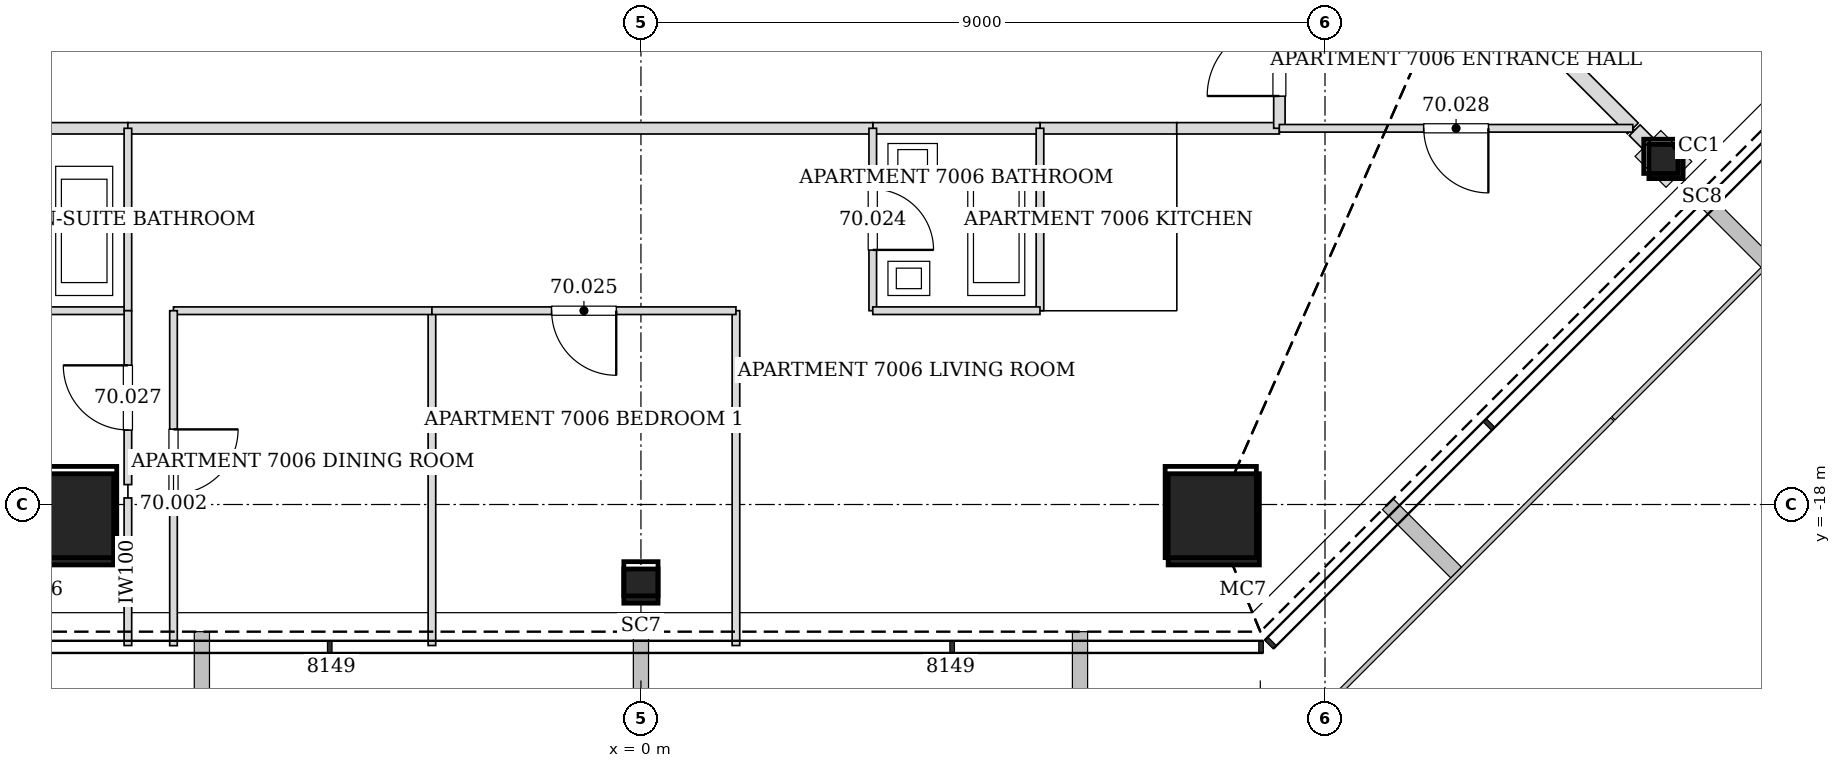
"""IFC4 building model, lengths in metres.
Left out: names, types, materials, properties, quantities, classifications, styles, units other than length and angle.
Written with IfcOpenShell. Run it as: python <this file> out.ifc"""

import sys

from ifc_helpers import new_model, si_unit, direction, frame, frame_2d, origin, origin_2d, place, context, subcontext, project, spatial, rectangle, hollow_rectangle, extrude, element, fill, save


model = new_model("IFC4")
c1 = context("Model", 3, precision=1e-05, world=origin(), true_north=direction((0.0, 1.0)))
c2 = subcontext(c1, "Body", "Model", "MODEL_VIEW")
j1 = project(units=[si_unit("LENGTHUNIT", "METRE"), si_unit("PLANEANGLEUNIT", "RADIAN")], contexts=[c1])
p1 = place(None, origin())
s1 = spatial("IfcSite", under=j1, at=p1, CompositionType="ELEMENT")
p2 = place(p1, origin())
s2 = spatial("IfcBuilding", under=s1, at=p2, CompositionType="ELEMENT")
p3 = place(p2, frame((0.0, 0.0, 287.8)))
s3 = spatial("IfcBuildingStorey", under=s2, at=p3, CompositionType="ELEMENT", Elevation=287.8)
for number, where, z_axis, x_axis in (
    (1, (-7.537, -18.195, 0.0), (0.012, 0.028, 1.0), (-0.924, 0.382, 0.0)),
    (2, (7.537, -18.195, 0.0), (-0.012, 0.028, 1.0), (-0.924, -0.382, 0.0)),
):
    element("IfcColumn", number, at=place(p3, frame(where, z_axis=z_axis, x_axis=x_axis)), inside=s3, PredefinedType="COLUMN", context=c2, shape_type="SweptSolid", body=[
        extrude(hollow_rectangle(XDim=1.2, YDim=1.2, WallThickness=0.055, at=origin_2d()), origin(), (0.0, 0.0, 1.0), 3.402),
    ])
for number, where, z_axis, x_axis in (
    (3, (0.0, -19.073, 0.0), (0.0, 0.028, 1.0), (-1.0, 0.0, 0.0)),
    (4, (13.487, -13.487, 0.0), (-0.02, 0.02, 1.0), (-0.707, -0.707, 0.0)),
):
    element("IfcColumn", number, at=place(p3, frame(where, z_axis=z_axis, x_axis=x_axis)), inside=s3, PredefinedType="COLUMN", context=c2, shape_type="SweptSolid", body=[
        extrude(hollow_rectangle(XDim=0.45, YDim=0.45, WallThickness=0.02, at=origin_2d()), origin(), (0.0, 0.0, 1.0), 3.401),
    ])
p4 = place(p3, frame((5.249, -13.05, 0.0), z_axis=(0.0, 0.0, 1.0), x_axis=(1.0, 0.0, 0.0)))
e5 = element("IfcWall", 5, at=p4, inside=s3, PredefinedType="PARTITIONING", context=c2, shape_type="SweptSolid", body=[
    extrude(rectangle(XDim=1.802, YDim=0.15, at=frame_2d((0.901, 0.0))), origin(), (0.0, 0.0, 1.0), 3.2),
])
for number, where, z_axis, x_axis in (
    (6, (3.049, -13.05, 0.0), (0.0, 0.0, 1.0), (1.0, 0.0, 0.0)),
    (7, (-8.951, -13.05, 0.0), (0.0, 0.0, 1.0), (1.0, 0.0, 0.0)),
):
    element("IfcWall", number, at=place(p3, frame(where, z_axis=z_axis, x_axis=x_axis)), inside=s3, PredefinedType="PARTITIONING", context=c2, shape_type="SweptSolid", body=[
        extrude(rectangle(XDim=2.202, YDim=0.15, at=frame_2d((1.101, 0.0))), origin(), (0.0, 0.0, 1.0), 3.2),
    ])
p5 = place(p3, frame((-6.751, -13.05, 0.0), z_axis=(0.0, 0.0, 1.0), x_axis=(1.0, 0.0, 0.0)))
e8 = element("IfcWall", 8, at=p5, inside=s3, PredefinedType="PARTITIONING", context=c2, shape_type="SweptSolid", body=[
    extrude(rectangle(XDim=9.802, YDim=0.15, at=frame_2d((4.901, 0.0))), origin(), (0.0, 0.0, 1.0), 2.349),
])
p6 = place(p3, frame((7.049, -13.05, 0.0), z_axis=(0.0, 0.0, 1.0), x_axis=(1.0, 0.0, 0.0)))
e9 = element("IfcWall", 9, at=p6, inside=s3, PredefinedType="PARTITIONING", context=c2, shape_type="SweptSolid", body=[
    extrude(rectangle(XDim=1.351, YDim=0.15, at=frame_2d((0.675, 0.0))), origin(), (0.0, 0.0, 1.0), 3.2),
])
p7 = place(p3, frame((8.4, -13.05, 0.0), z_axis=(0.0, 0.0, 1.0), x_axis=(0.0, 1.0, 0.0)))
e10 = element("IfcWall", 10, at=p7, inside=s3, PredefinedType="PARTITIONING", context=c2, shape_type="SweptSolid", body=[
    extrude(rectangle(XDim=1.8, YDim=0.15, at=frame_2d((0.9, 0.0))), origin(), (0.0, 0.0, 1.0), 3.2),
])
p8 = place(p7, frame((0.425, 0.0, 0.0)))
e11 = element("IfcOpeningElement", 11, at=p8, cuts=e10, PredefinedType="OPENING", context=c2, shape_type="SweptSolid", body=[
    extrude(rectangle(XDim=0.95, YDim=2.1, at=frame_2d((0.475, 1.05))), frame((0.0, 0.085, 0.0), z_axis=(0.0, -1.0, 0.0), x_axis=(1.0, 0.0, 0.0)), (0.0, 0.0, 1.0), 0.17),
])
p9 = place(p3, frame((-2.75, -19.855, 0.0), z_axis=(0.0, 0.0, 1.0), x_axis=(0.0, 1.0, 0.0)))
e12 = element("IfcWall", 12, at=p9, inside=s3, PredefinedType="PARTITIONING", context=c2, shape_type="SweptSolid", body=[
    extrude(rectangle(XDim=4.405, YDim=0.1, at=frame_2d((2.203, 0.0))), origin(), (0.0, 0.0, 1.0), 2.73),
])
p10 = place(p3, frame((-2.75, -15.45, 0.0), z_axis=(0.0, 0.0, 1.0), x_axis=(-1.0, 0.0, 0.0)))
e13 = element("IfcWall", 13, at=p10, inside=s3, PredefinedType="PARTITIONING", context=c2, shape_type="SweptSolid", body=[
    extrude(rectangle(XDim=3.4, YDim=0.1, at=frame_2d((1.7, 0.0))), origin(), (0.0, 0.0, 1.0), 3.2),
])
p11 = place(p3, frame((-6.15, -15.45, 0.0), z_axis=(0.0, 0.0, 1.0), x_axis=(0.0, -1.0, 0.0)))
e14 = element("IfcWall", 14, at=p11, inside=s3, PredefinedType="PARTITIONING", context=c2, shape_type="SweptSolid", body=[
    extrude(rectangle(XDim=4.407, YDim=0.1, at=frame_2d((2.204, 0.0))), origin(), (0.0, 0.0, 1.0), 2.73),
])
p12 = place(p11, frame((1.562, 0.0, 0.0)))
e15 = element("IfcOpeningElement", 15, at=p12, cuts=e14, PredefinedType="OPENING", context=c2, shape_type="SweptSolid", body=[
    extrude(rectangle(XDim=0.85, YDim=2.1, at=frame_2d((0.425, 1.05))), frame((0.0, 0.06, 0.0), z_axis=(0.0, -1.0, 0.0), x_axis=(1.0, 0.0, 0.0)), (0.0, 0.0, 1.0), 0.12),
])
p13 = place(p3, frame((13.075, -13.075, 0.0), z_axis=(0.0, 0.0, 1.0), x_axis=(0.707106781187, -0.707106781187, 0.0)))
e16 = element("IfcWall", 16, at=p13, inside=s3, PredefinedType="PARTITIONING", context=c2, shape_type="SweptSolid", body=[
    extrude(rectangle(XDim=0.242, YDim=0.2, at=frame_2d((0.121, 0.0))), origin(), (0.0, 0.0, 1.0), 2.591),
])
p14 = place(p3, frame((11.269, -11.269, 0.0), z_axis=(0.0, 0.0, 1.0), x_axis=(0.707106781187, -0.707106781187, 0.0)))
e17 = element("IfcWall", 17, at=p14, inside=s3, PredefinedType="PARTITIONING", context=c2, shape_type="SweptSolid", body=[
    extrude(rectangle(XDim=2.52, YDim=0.2, at=frame_2d((1.26, 0.0))), origin(), (0.0, 0.0, 1.0), 2.591),
])
p15 = place(p3, frame((5.25, -13.05, 0.0), z_axis=(0.0, 0.0, 1.0), x_axis=(0.0, -1.0, 0.0)))
e18 = element("IfcWall", 18, at=p15, inside=s3, PredefinedType="PARTITIONING", context=c2, shape_type="SweptSolid", body=[
    extrude(rectangle(XDim=2.4, YDim=0.1, at=frame_2d((1.2, 0.0))), origin(), (0.0, 0.0, 1.0), 2.591),
])
p16 = place(p3, frame((3.05, -13.05, 0.0), z_axis=(0.0, 0.0, 1.0), x_axis=(0.0, -1.0, 0.0)))
e19 = element("IfcWall", 19, at=p16, inside=s3, PredefinedType="PARTITIONING", context=c2, shape_type="SweptSolid", body=[
    extrude(rectangle(XDim=2.4, YDim=0.1, at=frame_2d((1.2, 0.0))), origin(), (0.0, 0.0, 1.0), 2.591),
])
p17 = place(p16, frame((0.8, 0.0, 0.0)))
e20 = element("IfcOpeningElement", 20, at=p17, cuts=e19, PredefinedType="OPENING", context=c2, shape_type="SweptSolid", body=[
    extrude(rectangle(XDim=0.8, YDim=2.1, at=frame_2d((0.4, 1.05))), frame((0.0, 0.06, 0.0), z_axis=(0.0, -1.0, 0.0), x_axis=(1.0, 0.0, 0.0)), (0.0, 0.0, 1.0), 0.12),
])
p18 = place(p3, frame((3.05, -15.45, 0.0), z_axis=(0.0, 0.0, 1.0), x_axis=(1.0, 0.0, 0.0)))
e21 = element("IfcWall", 21, at=p18, inside=s3, PredefinedType="PARTITIONING", context=c2, shape_type="SweptSolid", body=[
    extrude(rectangle(XDim=2.2, YDim=0.1, at=frame_2d((1.1, 0.0))), origin(), (0.0, 0.0, 1.0), 3.2),
])
p19 = place(p3, frame((1.25, -19.855, 0.0), z_axis=(0.0, 0.0, 1.0), x_axis=(0.0, 1.0, 0.0)))
e22 = element("IfcWall", 22, at=p19, inside=s3, PredefinedType="PARTITIONING", context=c2, shape_type="SweptSolid", body=[
    extrude(rectangle(XDim=4.405, YDim=0.1, at=frame_2d((2.203, 0.0))), origin(), (0.0, 0.0, 1.0), 2.73),
])
p20 = place(p3, frame((1.25, -15.45, 0.0), z_axis=(0.0, 0.0, 1.0), x_axis=(-1.0, 0.0, 0.0)))
e23 = element("IfcWall", 23, at=p20, inside=s3, PredefinedType="PARTITIONING", context=c2, shape_type="SweptSolid", body=[
    extrude(rectangle(XDim=4.0, YDim=0.1, at=frame_2d((2.0, 0.0))), origin(), (0.0, 0.0, 1.0), 2.349),
])
p21 = place(p20, frame((1.575, 0.0, 0.0)))
e24 = element("IfcOpeningElement", 24, at=p21, cuts=e23, PredefinedType="OPENING", context=c2, shape_type="SweptSolid", body=[
    extrude(rectangle(XDim=0.85, YDim=2.1, at=frame_2d((0.425, 1.05))), frame((0.0, 0.06, 0.0), z_axis=(0.0, -1.0, 0.0), x_axis=(1.0, 0.0, 0.0)), (0.0, 0.0, 1.0), 0.12),
])
p22 = place(p3, frame((-8.95, -15.45, 0.0), z_axis=(0.0, 0.0, 1.0), x_axis=(1.0, 0.0, 0.0)))
e25 = element("IfcWall", 25, at=p22, inside=s3, PredefinedType="PARTITIONING", context=c2, shape_type="SweptSolid", body=[
    extrude(rectangle(XDim=2.2, YDim=0.1, at=frame_2d((1.1, 0.0))), origin(), (0.0, 0.0, 1.0), 2.497),
])
p23 = place(p3, frame((-6.75, -15.45, 0.0), z_axis=(0.0, 0.0, 1.0), x_axis=(0.0, 1.0, 0.0)))
e26 = element("IfcWall", 26, at=p23, inside=s3, PredefinedType="PARTITIONING", context=c2, shape_type="SweptSolid", body=[
    extrude(rectangle(XDim=2.4, YDim=0.1, at=frame_2d((1.2, 0.0))), origin(), (0.0, 0.0, 1.0), 2.591),
])
p24 = place(p3, frame((-6.75, -19.855, 0.0), z_axis=(0.0, 0.0, 1.0), x_axis=(0.0, 1.0, 0.0)))
e27 = element("IfcWall", 27, at=p24, inside=s3, PredefinedType="PARTITIONING", context=c2, shape_type="SweptSolid", body=[
    extrude(rectangle(XDim=1.942, YDim=0.1, at=frame_2d((0.971, 0.0))), origin(), (0.0, 0.0, 1.0), 2.74),
])
p25 = place(p3, frame((-6.75, -17.738, 0.0), z_axis=(0.0, 0.0, 1.0), x_axis=(0.0, 1.0, 0.0)))
e28 = element("IfcWall", 28, at=p25, inside=s3, PredefinedType="PARTITIONING", context=c2, shape_type="SweptSolid", body=[
    extrude(rectangle(XDim=2.288, YDim=0.1, at=frame_2d((1.144, 0.0))), origin(), (0.0, 0.0, 1.0), 2.73),
])
p26 = place(p25, frame((0.719, 0.0, 0.0)))
e29 = element("IfcOpeningElement", 29, at=p26, cuts=e28, PredefinedType="OPENING", context=c2, shape_type="SweptSolid", body=[
    extrude(rectangle(XDim=0.85, YDim=2.1, at=frame_2d((0.425, 1.05))), frame((0.0, 0.06, 0.0), z_axis=(0.0, -1.0, 0.0), x_axis=(1.0, 0.0, 0.0)), (0.0, 0.0, 1.0), 0.12),
])
p27 = place(p3, frame((13.05, -13.05, 0.0), z_axis=(0.0, 0.0, 1.0), x_axis=(-1.0, 0.0, 0.0)))
e30 = element("IfcWall", 30, at=p27, inside=s3, PredefinedType="PARTITIONING", context=c2, shape_type="SweptSolid", body=[
    extrude(rectangle(XDim=4.651, YDim=0.1, at=frame_2d((2.326, 0.0))), origin(), (0.0, 0.0, 1.0), 2.497),
])
p28 = place(p27, frame((1.9, 0.0, 0.0)))
e31 = element("IfcOpeningElement", 31, at=p28, cuts=e30, PredefinedType="OPENING", context=c2, shape_type="SweptSolid", body=[
    extrude(rectangle(XDim=0.85, YDim=2.1, at=frame_2d((0.425, 1.05))), frame((0.0, 0.06, 0.0), z_axis=(0.0, -1.0, 0.0), x_axis=(1.0, 0.0, 0.0)), (0.0, 0.0, 1.0), 0.12),
])
p29 = place(p12, origin())
e32 = element("IfcDoor", 32, at=p29, inside=s3, OperationType="SINGLE_SWING_LEFT", PredefinedType="DOOR", context=c2, shape_type="SweptSolid", body=[
    extrude(rectangle(XDim=0.85, YDim=2.1, at=frame_2d((0.425, 1.05))), frame((0.0, 0.025, 0.0), z_axis=(0.0, -1.0, 0.0), x_axis=(1.0, 0.0, 0.0)), (0.0, 0.0, 1.0), 0.05),
])
fill(e15, e32)
p30 = place(p17, origin())
e33 = element("IfcDoor", 33, at=p30, inside=s3, OperationType="SINGLE_SWING_RIGHT", PredefinedType="DOOR", context=c2, shape_type="SweptSolid", body=[
    extrude(rectangle(XDim=0.8, YDim=2.1, at=frame_2d((0.4, 1.05))), frame((0.0, 0.025, 0.0), z_axis=(0.0, -1.0, 0.0), x_axis=(1.0, 0.0, 0.0)), (0.0, 0.0, 1.0), 0.05),
])
fill(e20, e33)
p31 = place(p21, origin())
e34 = element("IfcDoor", 34, at=p31, inside=s3, OperationType="SINGLE_SWING_LEFT", PredefinedType="DOOR", context=c2, shape_type="SweptSolid", body=[
    extrude(rectangle(XDim=0.85, YDim=2.1, at=frame_2d((0.425, 1.05))), frame((0.0, 0.025, 0.0), z_axis=(0.0, -1.0, 0.0), x_axis=(1.0, 0.0, 0.0)), (0.0, 0.0, 1.0), 0.05),
])
fill(e24, e34)
p32 = place(p26, origin())
e35 = element("IfcDoor", 35, at=p32, inside=s3, OperationType="SINGLE_SWING_RIGHT", PredefinedType="DOOR", context=c2, shape_type="SweptSolid", body=[
    extrude(rectangle(XDim=0.85, YDim=2.1, at=frame_2d((0.425, 1.05))), frame((0.0, 0.025, 0.0), z_axis=(0.0, -1.0, 0.0), x_axis=(1.0, 0.0, 0.0)), (0.0, 0.0, 1.0), 0.05),
])
fill(e29, e35)
p33 = place(p28, origin())
e36 = element("IfcDoor", 36, at=p33, inside=s3, OperationType="SINGLE_SWING_LEFT", PredefinedType="DOOR", context=c2, shape_type="SweptSolid", body=[
    extrude(rectangle(XDim=0.85, YDim=2.1, at=frame_2d((0.425, 1.05))), frame((0.0, 0.025, 0.0), z_axis=(0.0, -1.0, 0.0), x_axis=(1.0, 0.0, 0.0)), (0.0, 0.0, 1.0), 0.05),
])
fill(e31, e36)
p34 = place(p8, origin())
e37 = element("IfcDoor", 37, at=p34, inside=s3, OperationType="SINGLE_SWING_LEFT", PredefinedType="DOOR", context=c2, shape_type="SweptSolid", body=[
    extrude(rectangle(XDim=0.95, YDim=2.1, at=frame_2d((0.475, 1.05))), frame((0.0, 0.025, 0.0), z_axis=(0.0, -1.0, 0.0), x_axis=(1.0, 0.0, 0.0)), (0.0, 0.0, 1.0), 0.05),
])
fill(e11, e37)
save(model, sys.argv[1])
